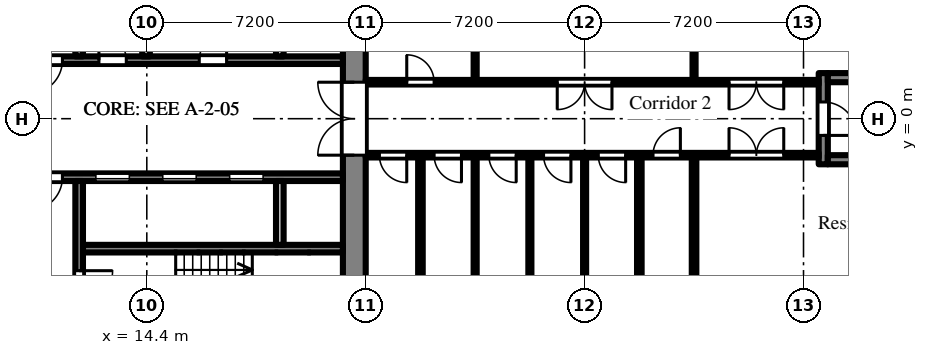
"""IFC4 building model, lengths in metres.
Left out: names, types, materials, properties, quantities, classifications, styles, units other than length and angle.
Written with IfcOpenShell. Run it as: python <this file> out.ifc"""

import sys

from ifc_helpers import new_model, si_unit, direction, frame, frame_2d, origin, place, context, subcontext, project, spatial, rectangle, extrude, element, fill, save


model = new_model("IFC4")
c1 = context("Model", 3, precision=1e-05, world=origin(), true_north=direction((0.0, 1.0)))
c2 = subcontext(c1, "Body", "Model", "MODEL_VIEW")
j1 = project(units=[si_unit("LENGTHUNIT", "METRE"), si_unit("PLANEANGLEUNIT", "RADIAN")], contexts=[c1])
p1 = place(None, origin())
s1 = spatial("IfcSite", under=j1, at=p1, CompositionType="ELEMENT")
p2 = place(p1, origin())
s2 = spatial("IfcBuilding", under=s1, at=p2, CompositionType="ELEMENT")
p3 = place(p2, frame((0.0, 0.0, 20.7)))
s3 = spatial("IfcBuildingStorey", under=s2, at=p3, CompositionType="ELEMENT", Elevation=20.7)
p4 = place(p3, frame((21.225, -7.2, 0.0), z_axis=(0.0, 0.0, 1.0), x_axis=(0.0, 1.0, 0.0)))
e1 = element("IfcWall", 1, at=p4, inside=s3, PredefinedType="SHEAR", context=c2, shape_type="SweptSolid", body=[
    extrude(rectangle(XDim=14.4, YDim=0.75, at=frame_2d((7.2, 0.0))), origin(), (0.0, 0.0, 1.0), 2.575),
])
p5 = place(p4, frame((6.0, 0.0, 0.0)))
e2 = element("IfcOpeningElement", 2, at=p5, cuts=e1, PredefinedType="OPENING", context=c2, shape_type="SweptSolid", body=[
    extrude(rectangle(XDim=2.4, YDim=2.2, at=frame_2d((1.2, 1.1))), frame((0.0, 0.385, 0.0), z_axis=(0.0, -1.0, 0.0), x_axis=(1.0, 0.0, 0.0)), (0.0, 0.0, 1.0), 0.77),
])
p6 = place(p3, frame((7.9, 1.925, 0.0), z_axis=(0.0, 0.0, 1.0), x_axis=(1.0, 0.0, 0.0)))
e3 = element("IfcWall", 3, at=p6, inside=s3, PredefinedType="SHEAR", context=c2, shape_type="SweptSolid", body=[
    extrude(rectangle(XDim=12.95, YDim=0.25, at=frame_2d((6.475, 0.0))), origin(), (0.0, 0.0, 1.0), 2.575),
])
p7 = place(p6, frame((0.525, 0.0, 0.0)))
e4 = element("IfcOpeningElement", 4, at=p7, cuts=e3, PredefinedType="OPENING", context=c2, shape_type="SweptSolid", body=[
    extrude(rectangle(XDim=0.9, YDim=2.1, at=frame_2d((0.45, 1.05))), frame((0.0, 0.135, 0.0), z_axis=(0.0, -1.0, 0.0), x_axis=(1.0, 0.0, 0.0)), (0.0, 0.0, 1.0), 0.27),
])
p8 = place(p6, frame((2.625, 0.0, 0.0)))
e5 = element("IfcOpeningElement", 5, at=p8, cuts=e3, PredefinedType="OPENING", context=c2, shape_type="SweptSolid", body=[
    extrude(rectangle(XDim=1.1, YDim=2.1, at=frame_2d((0.55, 1.05))), frame((0.0, 0.135, 0.0), z_axis=(0.0, -1.0, 0.0), x_axis=(1.0, 0.0, 0.0)), (0.0, 0.0, 1.0), 0.27),
])
p9 = place(p6, frame((4.925, 0.0, 0.0)))
e6 = element("IfcOpeningElement", 6, at=p9, cuts=e3, PredefinedType="OPENING", context=c2, shape_type="SweptSolid", body=[
    extrude(rectangle(XDim=0.9, YDim=2.1, at=frame_2d((0.45, 1.05))), frame((0.0, 0.135, 0.0), z_axis=(0.0, -1.0, 0.0), x_axis=(1.0, 0.0, 0.0)), (0.0, 0.0, 1.0), 0.27),
])
p10 = place(p6, frame((8.225, 0.0, 0.0)))
e7 = element("IfcOpeningElement", 7, at=p10, cuts=e3, PredefinedType="OPENING", context=c2, shape_type="SweptSolid", body=[
    extrude(rectangle(XDim=0.9, YDim=2.1, at=frame_2d((0.45, 1.05))), frame((0.0, 0.135, 0.0), z_axis=(0.0, -1.0, 0.0), x_axis=(1.0, 0.0, 0.0)), (0.0, 0.0, 1.0), 0.27),
])
p11 = place(p3, frame((12.175, 2.05, 0.0), z_axis=(0.0, 0.0, 1.0), x_axis=(0.0, 1.0, 0.0)))
e8 = element("IfcWall", 8, at=p11, inside=s3, PredefinedType="SHEAR", context=c2, shape_type="SweptSolid", body=[
    extrude(rectangle(XDim=4.65, YDim=0.25, at=frame_2d((2.325, 0.0))), origin(), (0.0, 0.0, 1.0), 2.575),
])
p12 = place(p11, frame((2.95, 0.0, 0.0)))
e9 = element("IfcOpeningElement", 9, at=p12, cuts=e8, PredefinedType="OPENING", context=c2, shape_type="SweptSolid", body=[
    extrude(rectangle(XDim=1.1, YDim=2.1, at=frame_2d((0.55, 1.05))), frame((0.0, 0.135, 0.0), z_axis=(0.0, -1.0, 0.0), x_axis=(1.0, 0.0, 0.0)), (0.0, 0.0, 1.0), 0.27),
])
for number, where, z_axis, x_axis in (
    (10, (14.375, 2.05, 0.0), (0.0, 0.0, 1.0), (0.0, 1.0, 0.0)),
    (11, (18.775, 2.05, 0.0), (0.0, 0.0, 1.0), (0.0, 1.0, 0.0)),
):
    element("IfcWall", number, at=place(p3, frame(where, z_axis=z_axis, x_axis=x_axis)), inside=s3, PredefinedType="PARTITIONING", context=c2, shape_type="SweptSolid", body=[
        extrude(rectangle(XDim=2.1, YDim=0.25, at=frame_2d((1.05, 0.0))), origin(), (0.0, 0.0, 1.0), 2.575),
    ])
p13 = place(p3, frame((7.9, -1.925, 0.0), z_axis=(0.0, 0.0, 1.0), x_axis=(1.0, 0.0, 0.0)))
e12 = element("IfcWall", 12, at=p13, inside=s3, PredefinedType="SHEAR", context=c2, shape_type="SweptSolid", body=[
    extrude(rectangle(XDim=12.95, YDim=0.25, at=frame_2d((6.475, 0.0))), origin(), (0.0, 0.0, 1.0), 2.575),
])
p14 = place(p13, frame((4.825, 0.0, 0.0)))
e13 = element("IfcOpeningElement", 13, at=p14, cuts=e12, PredefinedType="OPENING", context=c2, shape_type="SweptSolid", body=[
    extrude(rectangle(XDim=1.1, YDim=2.1, at=frame_2d((0.55, 1.05))), frame((0.0, 0.135, 0.0), z_axis=(0.0, -1.0, 0.0), x_axis=(1.0, 0.0, 0.0)), (0.0, 0.0, 1.0), 0.27),
])
p15 = place(p13, frame((7.025, 0.0, 0.0)))
e14 = element("IfcOpeningElement", 14, at=p15, cuts=e12, PredefinedType="OPENING", context=c2, shape_type="SweptSolid", body=[
    extrude(rectangle(XDim=1.1, YDim=2.1, at=frame_2d((0.55, 1.05))), frame((0.0, 0.135, 0.0), z_axis=(0.0, -1.0, 0.0), x_axis=(1.0, 0.0, 0.0)), (0.0, 0.0, 1.0), 0.27),
])
p16 = place(p13, frame((9.225, 0.0, 0.0)))
e15 = element("IfcOpeningElement", 15, at=p16, cuts=e12, PredefinedType="OPENING", context=c2, shape_type="SweptSolid", body=[
    extrude(rectangle(XDim=1.1, YDim=2.1, at=frame_2d((0.55, 1.05))), frame((0.0, 0.135, 0.0), z_axis=(0.0, -1.0, 0.0), x_axis=(1.0, 0.0, 0.0)), (0.0, 0.0, 1.0), 0.27),
])
p17 = place(p13, frame((0.525, 0.0, 0.0)))
e16 = element("IfcOpeningElement", 16, at=p17, cuts=e12, PredefinedType="OPENING", context=c2, shape_type="SweptSolid", body=[
    extrude(rectangle(XDim=0.9, YDim=2.1, at=frame_2d((0.45, 1.05))), frame((0.0, 0.135, 0.0), z_axis=(0.0, -1.0, 0.0), x_axis=(1.0, 0.0, 0.0)), (0.0, 0.0, 1.0), 0.27),
])
p18 = place(p13, frame((2.625, 0.0, 0.0)))
e17 = element("IfcOpeningElement", 17, at=p18, cuts=e12, PredefinedType="OPENING", context=c2, shape_type="SweptSolid", body=[
    extrude(rectangle(XDim=1.1, YDim=2.1, at=frame_2d((0.55, 1.05))), frame((0.0, 0.135, 0.0), z_axis=(0.0, -1.0, 0.0), x_axis=(1.0, 0.0, 0.0)), (0.0, 0.0, 1.0), 0.27),
])
p19 = place(p3, frame((12.3, -4.275, 0.0), z_axis=(0.0, 0.0, 1.0), x_axis=(1.0, 0.0, 0.0)))
e18 = element("IfcWall", 18, at=p19, inside=s3, PredefinedType="SHEAR", context=c2, shape_type="SweptSolid", body=[
    extrude(rectangle(XDim=8.55, YDim=0.25, at=frame_2d((4.275, 0.0))), origin(), (0.0, 0.0, 1.0), 2.575),
])
p20 = place(p3, frame((12.175, -2.05, 0.0), z_axis=(0.0, 0.0, 1.0), x_axis=(0.0, -1.0, 0.0)))
e19 = element("IfcWall", 19, at=p20, inside=s3, PredefinedType="SHEAR", context=c2, shape_type="SweptSolid", body=[
    extrude(rectangle(XDim=4.65, YDim=0.25, at=frame_2d((2.325, 0.0))), origin(), (0.0, 0.0, 1.0), 2.575),
])
p21 = place(p20, frame((2.95, 0.0, 0.0)))
e20 = element("IfcOpeningElement", 20, at=p21, cuts=e19, PredefinedType="OPENING", context=c2, shape_type="SweptSolid", body=[
    extrude(rectangle(XDim=1.1, YDim=2.1, at=frame_2d((0.55, 1.05))), frame((0.0, 0.135, 0.0), z_axis=(0.0, -1.0, 0.0), x_axis=(1.0, 0.0, 0.0)), (0.0, 0.0, 1.0), 0.27),
])
p22 = place(p3, frame((18.775, -2.05, 0.0), z_axis=(0.0, 0.0, 1.0), x_axis=(0.0, -1.0, 0.0)))
e21 = element("IfcWall", 21, at=p22, inside=s3, PredefinedType="PARTITIONING", context=c2, shape_type="SweptSolid", body=[
    extrude(rectangle(XDim=2.1, YDim=0.25, at=frame_2d((1.05, 0.0))), origin(), (0.0, 0.0, 1.0), 2.575),
])
p23 = place(p3, frame((36.65, -1.5, 0.0), z_axis=(0.0, 0.0, 1.0), x_axis=(0.0, 1.0, 0.0)))
e22 = element("IfcWall", 22, at=p23, inside=s3, PredefinedType="SHEAR", context=c2, shape_type="SweptSolid", body=[
    extrude(rectangle(XDim=3.0, YDim=0.3, at=frame_2d((1.5, 0.0))), origin(), (0.0, 0.0, 1.0), 2.575),
])
p24 = place(p23, frame((0.95, 0.0, 0.0)))
e23 = element("IfcOpeningElement", 23, at=p24, cuts=e22, PredefinedType="OPENING", context=c2, shape_type="SweptSolid", body=[
    extrude(rectangle(XDim=1.1, YDim=2.1, at=frame_2d((0.55, 1.05))), frame((0.0, 0.16, 0.0), z_axis=(0.0, -1.0, 0.0), x_axis=(1.0, 0.0, 0.0)), (0.0, 0.0, 1.0), 0.32),
])
for number, where, z_axis, x_axis in (
    (24, (36.8, -1.35, 0.0), (0.0, 0.0, 1.0), (1.0, 0.0, 0.0)),
    (25, (36.8, 1.35, 0.0), (0.0, 0.0, 1.0), (1.0, 0.0, 0.0)),
):
    element("IfcWall", number, at=place(p3, frame(where, z_axis=z_axis, x_axis=x_axis)), inside=s3, PredefinedType="SHEAR", context=c2, shape_type="SweptSolid", body=[
        extrude(rectangle(XDim=5.8, YDim=0.3, at=frame_2d((2.9, 0.0))), origin(), (0.0, 0.0, 1.0), 2.575),
    ])
p25 = place(p3, frame((21.6, -1.2, 0.0), z_axis=(0.0, 0.0, 1.0), x_axis=(1.0, 0.0, 0.0)))
e26 = element("IfcWall", 26, at=p25, inside=s3, PredefinedType="PARTITIONING", context=c2, shape_type="SweptSolid", body=[
    extrude(rectangle(XDim=14.9, YDim=0.15, at=frame_2d((7.45, 0.0))), origin(), (0.0, 0.0, 1.0), 2.575),
])
p26 = place(p25, frame((0.45, 0.0, 0.0)))
e27 = element("IfcOpeningElement", 27, at=p26, cuts=e26, PredefinedType="OPENING", context=c2, shape_type="SweptSolid", body=[
    extrude(rectangle(XDim=0.9, YDim=2.1, at=frame_2d((0.45, 1.05))), frame((0.0, 0.085, 0.0), z_axis=(0.0, -1.0, 0.0), x_axis=(1.0, 0.0, 0.0)), (0.0, 0.0, 1.0), 0.17),
])
p27 = place(p25, frame((2.25, 0.0, 0.0)))
e28 = element("IfcOpeningElement", 28, at=p27, cuts=e26, PredefinedType="OPENING", context=c2, shape_type="SweptSolid", body=[
    extrude(rectangle(XDim=0.9, YDim=2.1, at=frame_2d((0.45, 1.05))), frame((0.0, 0.085, 0.0), z_axis=(0.0, -1.0, 0.0), x_axis=(1.0, 0.0, 0.0)), (0.0, 0.0, 1.0), 0.17),
])
p28 = place(p25, frame((4.05, 0.0, 0.0)))
e29 = element("IfcOpeningElement", 29, at=p28, cuts=e26, PredefinedType="OPENING", context=c2, shape_type="SweptSolid", body=[
    extrude(rectangle(XDim=0.9, YDim=2.1, at=frame_2d((0.45, 1.05))), frame((0.0, 0.085, 0.0), z_axis=(0.0, -1.0, 0.0), x_axis=(1.0, 0.0, 0.0)), (0.0, 0.0, 1.0), 0.17),
])
p29 = place(p25, frame((5.85, 0.0, 0.0)))
e30 = element("IfcOpeningElement", 30, at=p29, cuts=e26, PredefinedType="OPENING", context=c2, shape_type="SweptSolid", body=[
    extrude(rectangle(XDim=0.9, YDim=2.1, at=frame_2d((0.45, 1.05))), frame((0.0, 0.085, 0.0), z_axis=(0.0, -1.0, 0.0), x_axis=(1.0, 0.0, 0.0)), (0.0, 0.0, 1.0), 0.17),
])
p30 = place(p25, frame((7.65, 0.0, 0.0)))
e31 = element("IfcOpeningElement", 31, at=p30, cuts=e26, PredefinedType="OPENING", context=c2, shape_type="SweptSolid", body=[
    extrude(rectangle(XDim=0.9, YDim=2.1, at=frame_2d((0.45, 1.05))), frame((0.0, 0.085, 0.0), z_axis=(0.0, -1.0, 0.0), x_axis=(1.0, 0.0, 0.0)), (0.0, 0.0, 1.0), 0.17),
])
p31 = place(p25, frame((9.45, 0.0, 0.0)))
e32 = element("IfcOpeningElement", 32, at=p31, cuts=e26, PredefinedType="OPENING", context=c2, shape_type="SweptSolid", body=[
    extrude(rectangle(XDim=0.9, YDim=2.1, at=frame_2d((0.45, 1.05))), frame((0.0, 0.085, 0.0), z_axis=(0.0, -1.0, 0.0), x_axis=(1.0, 0.0, 0.0)), (0.0, 0.0, 1.0), 0.17),
])
p32 = place(p25, frame((11.95, 0.0, 0.0)))
e33 = element("IfcOpeningElement", 33, at=p32, cuts=e26, PredefinedType="OPENING", context=c2, shape_type="SweptSolid", body=[
    extrude(rectangle(XDim=1.8, YDim=2.1, at=frame_2d((0.9, 1.05))), frame((0.0, 0.085, 0.0), z_axis=(0.0, -1.0, 0.0), x_axis=(1.0, 0.0, 0.0)), (0.0, 0.0, 1.0), 0.17),
])
p33 = place(p3, frame((21.6, 1.2, 0.0), z_axis=(0.0, 0.0, 1.0), x_axis=(1.0, 0.0, 0.0)))
e34 = element("IfcWall", 34, at=p33, inside=s3, PredefinedType="PARTITIONING", context=c2, shape_type="SweptSolid", body=[
    extrude(rectangle(XDim=14.9, YDim=0.15, at=frame_2d((7.45, 0.0))), origin(), (0.0, 0.0, 1.0), 2.575),
])
p34 = place(p33, frame((1.35, 0.0, 0.0)))
e35 = element("IfcOpeningElement", 35, at=p34, cuts=e34, PredefinedType="OPENING", context=c2, shape_type="SweptSolid", body=[
    extrude(rectangle(XDim=0.9, YDim=2.1, at=frame_2d((0.45, 1.05))), frame((0.0, 0.085, 0.0), z_axis=(0.0, -1.0, 0.0), x_axis=(1.0, 0.0, 0.0)), (0.0, 0.0, 1.0), 0.17),
])
p35 = place(p33, frame((6.3, 0.0, 0.0)))
e36 = element("IfcOpeningElement", 36, at=p35, cuts=e34, PredefinedType="OPENING", context=c2, shape_type="SweptSolid", body=[
    extrude(rectangle(XDim=1.8, YDim=2.1, at=frame_2d((0.9, 1.05))), frame((0.0, 0.085, 0.0), z_axis=(0.0, -1.0, 0.0), x_axis=(1.0, 0.0, 0.0)), (0.0, 0.0, 1.0), 0.17),
])
p36 = place(p33, frame((11.95, 0.0, 0.0)))
e37 = element("IfcOpeningElement", 37, at=p36, cuts=e34, PredefinedType="OPENING", context=c2, shape_type="SweptSolid", body=[
    extrude(rectangle(XDim=1.8, YDim=2.1, at=frame_2d((0.9, 1.05))), frame((0.0, 0.085, 0.0), z_axis=(0.0, -1.0, 0.0), x_axis=(1.0, 0.0, 0.0)), (0.0, 0.0, 1.0), 0.17),
])
p37 = place(p3, frame((23.4, -6.9, 0.0), z_axis=(0.0, 0.0, 1.0), x_axis=(0.0, 1.0, 0.0)))
e38 = element("IfcWall", 38, at=p37, inside=s3, PredefinedType="PARTITIONING", context=c2, shape_type="SweptSolid", body=[
    extrude(rectangle(XDim=5.625, YDim=0.15, at=frame_2d((2.812, 0.0))), origin(), (0.0, 0.0, 1.0), 2.575),
])
for number, where, z_axis, x_axis in (
    (39, (25.2, -6.9, 0.0), (0.0, 0.0, 1.0), (0.0, 1.0, 0.0)),
    (40, (25.2, 1.275, 0.0), (0.0, 0.0, 1.0), (0.0, 1.0, 0.0)),
    (41, (27.0, -6.9, 0.0), (0.0, 0.0, 1.0), (0.0, 1.0, 0.0)),
    (42, (28.8, -6.9, 0.0), (0.0, 0.0, 1.0), (0.0, 1.0, 0.0)),
):
    element("IfcWall", number, at=place(p3, frame(where, z_axis=z_axis, x_axis=x_axis)), inside=s3, PredefinedType="PARTITIONING", context=c2, shape_type="SweptSolid", body=[
        extrude(rectangle(XDim=5.625, YDim=0.1, at=frame_2d((2.812, 0.0))), origin(), (0.0, 0.0, 1.0), 2.575),
    ])
for number, where, z_axis, x_axis in (
    (43, (30.6, -6.9, 0.0), (0.0, 0.0, 1.0), (0.0, 1.0, 0.0)),
    (44, (32.4, -6.9, 0.0), (0.0, 0.0, 1.0), (0.0, 1.0, 0.0)),
):
    element("IfcWall", number, at=place(p3, frame(where, z_axis=z_axis, x_axis=x_axis)), inside=s3, PredefinedType="PARTITIONING", context=c2, shape_type="SweptSolid", body=[
        extrude(rectangle(XDim=5.625, YDim=0.15, at=frame_2d((2.812, 0.0))), origin(), (0.0, 0.0, 1.0), 2.575),
    ])
p38 = place(p3, frame((32.4, 1.275, 0.0), z_axis=(0.0, 0.0, 1.0), x_axis=(0.0, 1.0, 0.0)))
e45 = element("IfcWall", 45, at=p38, inside=s3, PredefinedType="PARTITIONING", context=c2, shape_type="SweptSolid", body=[
    extrude(rectangle(XDim=5.625, YDim=0.1, at=frame_2d((2.812, 0.0))), origin(), (0.0, 0.0, 1.0), 2.575),
])
p39 = place(p14, origin())
e46 = element("IfcDoor", 46, at=p39, inside=s3, OperationType="SLIDING_TO_LEFT", PredefinedType="DOOR", context=c2, shape_type="SweptSolid", body=[
    extrude(rectangle(XDim=1.1, YDim=2.1, at=frame_2d((0.55, 1.05))), frame((0.0, 0.025, 0.0), z_axis=(0.0, -1.0, 0.0), x_axis=(1.0, 0.0, 0.0)), (0.0, 0.0, 1.0), 0.05),
])
fill(e13, e46)
p40 = place(p15, origin())
e47 = element("IfcDoor", 47, at=p40, inside=s3, OperationType="SLIDING_TO_LEFT", PredefinedType="DOOR", context=c2, shape_type="SweptSolid", body=[
    extrude(rectangle(XDim=1.1, YDim=2.1, at=frame_2d((0.55, 1.05))), frame((0.0, 0.025, 0.0), z_axis=(0.0, -1.0, 0.0), x_axis=(1.0, 0.0, 0.0)), (0.0, 0.0, 1.0), 0.05),
])
fill(e14, e47)
p41 = place(p16, origin())
e48 = element("IfcDoor", 48, at=p41, inside=s3, OperationType="SLIDING_TO_LEFT", PredefinedType="DOOR", context=c2, shape_type="SweptSolid", body=[
    extrude(rectangle(XDim=1.1, YDim=2.1, at=frame_2d((0.55, 1.05))), frame((0.0, 0.025, 0.0), z_axis=(0.0, -1.0, 0.0), x_axis=(1.0, 0.0, 0.0)), (0.0, 0.0, 1.0), 0.05),
])
fill(e15, e48)
p42 = place(p21, origin())
e49 = element("IfcDoor", 49, at=p42, inside=s3, OperationType="SINGLE_SWING_LEFT", PredefinedType="DOOR", context=c2, shape_type="SweptSolid", body=[
    extrude(rectangle(XDim=1.1, YDim=2.1, at=frame_2d((0.55, 1.05))), frame((0.0, 0.025, 0.0), z_axis=(0.0, -1.0, 0.0), x_axis=(1.0, 0.0, 0.0)), (0.0, 0.0, 1.0), 0.05),
])
fill(e20, e49)
p43 = place(p8, frame((1.1, 0.0, 0.0), z_axis=(0.0, 0.0, 1.0), x_axis=(-1.0, 0.0, 0.0)))
e50 = element("IfcDoor", 50, at=p43, inside=s3, OperationType="SINGLE_SWING_RIGHT", PredefinedType="DOOR", context=c2, shape_type="SweptSolid", body=[
    extrude(rectangle(XDim=1.1, YDim=2.1, at=frame_2d((0.55, 1.05))), frame((0.0, 0.025, 0.0), z_axis=(0.0, -1.0, 0.0), x_axis=(1.0, 0.0, 0.0)), (0.0, 0.0, 1.0), 0.05),
])
fill(e5, e50)
p44 = place(p18, frame((1.1, 0.0, 0.0), z_axis=(0.0, 0.0, 1.0), x_axis=(-1.0, 0.0, 0.0)))
e51 = element("IfcDoor", 51, at=p44, inside=s3, OperationType="SINGLE_SWING_RIGHT", PredefinedType="DOOR", context=c2, shape_type="SweptSolid", body=[
    extrude(rectangle(XDim=1.1, YDim=2.1, at=frame_2d((0.55, 1.05))), frame((0.0, 0.025, 0.0), z_axis=(0.0, -1.0, 0.0), x_axis=(1.0, 0.0, 0.0)), (0.0, 0.0, 1.0), 0.05),
])
fill(e17, e51)
p45 = place(p5, origin())
e52 = element("IfcDoor", 52, at=p45, inside=s3, OperationType="DOUBLE_DOOR_DOUBLE_SWING", PredefinedType="DOOR", context=c2, shape_type="SweptSolid", body=[
    extrude(rectangle(XDim=2.4, YDim=2.2, at=frame_2d((1.2, 1.1))), frame((0.0, 0.025, 0.0), z_axis=(0.0, -1.0, 0.0), x_axis=(1.0, 0.0, 0.0)), (0.0, 0.0, 1.0), 0.05),
])
fill(e2, e52)
p46 = place(p9, origin())
e53 = element("IfcDoor", 53, at=p46, inside=s3, OperationType="SINGLE_SWING_LEFT", PredefinedType="DOOR", context=c2, shape_type="SweptSolid", body=[
    extrude(rectangle(XDim=0.9, YDim=2.1, at=frame_2d((0.45, 1.05))), frame((0.0, 0.025, 0.0), z_axis=(0.0, -1.0, 0.0), x_axis=(1.0, 0.0, 0.0)), (0.0, 0.0, 1.0), 0.05),
])
fill(e6, e53)
p47 = place(p10, origin())
e54 = element("IfcDoor", 54, at=p47, inside=s3, OperationType="SINGLE_SWING_RIGHT", PredefinedType="DOOR", context=c2, shape_type="SweptSolid", body=[
    extrude(rectangle(XDim=0.9, YDim=2.1, at=frame_2d((0.45, 1.05))), frame((0.0, 0.025, 0.0), z_axis=(0.0, -1.0, 0.0), x_axis=(1.0, 0.0, 0.0)), (0.0, 0.0, 1.0), 0.05),
])
fill(e7, e54)
p48 = place(p24, frame((1.1, 0.0, 0.0), z_axis=(0.0, 0.0, 1.0), x_axis=(-1.0, 0.0, 0.0)))
e55 = element("IfcDoor", 55, at=p48, inside=s3, OperationType="SINGLE_SWING_RIGHT", PredefinedType="DOOR", context=c2, shape_type="SweptSolid", body=[
    extrude(rectangle(XDim=1.1, YDim=2.1, at=frame_2d((0.55, 1.05))), frame((0.0, 0.025, 0.0), z_axis=(0.0, -1.0, 0.0), x_axis=(1.0, 0.0, 0.0)), (0.0, 0.0, 1.0), 0.05),
])
fill(e23, e55)
p49 = place(p34, origin())
e56 = element("IfcDoor", 56, at=p49, inside=s3, OperationType="SINGLE_SWING_LEFT", PredefinedType="DOOR", context=c2, shape_type="SweptSolid", body=[
    extrude(rectangle(XDim=0.9, YDim=2.1, at=frame_2d((0.45, 1.05))), frame((0.0, 0.025, 0.0), z_axis=(0.0, -1.0, 0.0), x_axis=(1.0, 0.0, 0.0)), (0.0, 0.0, 1.0), 0.05),
])
fill(e35, e56)
p50 = place(p35, frame((1.8, 0.0, 0.0), z_axis=(0.0, 0.0, 1.0), x_axis=(-1.0, 0.0, 0.0)))
e57 = element("IfcDoor", 57, at=p50, inside=s3, OperationType="DOUBLE_DOOR_DOUBLE_SWING", PredefinedType="DOOR", context=c2, shape_type="SweptSolid", body=[
    extrude(rectangle(XDim=1.8, YDim=2.1, at=frame_2d((0.9, 1.05))), frame((0.0, 0.025, 0.0), z_axis=(0.0, -1.0, 0.0), x_axis=(1.0, 0.0, 0.0)), (0.0, 0.0, 1.0), 0.05),
])
fill(e36, e57)
p51 = place(p36, frame((1.8, 0.0, 0.0), z_axis=(0.0, 0.0, 1.0), x_axis=(-1.0, 0.0, 0.0)))
e58 = element("IfcDoor", 58, at=p51, inside=s3, OperationType="DOUBLE_DOOR_DOUBLE_SWING", PredefinedType="DOOR", context=c2, shape_type="SweptSolid", body=[
    extrude(rectangle(XDim=1.8, YDim=2.1, at=frame_2d((0.9, 1.05))), frame((0.0, 0.025, 0.0), z_axis=(0.0, -1.0, 0.0), x_axis=(1.0, 0.0, 0.0)), (0.0, 0.0, 1.0), 0.05),
])
fill(e37, e58)
p52 = place(p26, frame((0.9, 0.0, 0.0), z_axis=(0.0, 0.0, 1.0), x_axis=(-1.0, 0.0, 0.0)))
e59 = element("IfcDoor", 59, at=p52, inside=s3, OperationType="SINGLE_SWING_LEFT", PredefinedType="DOOR", context=c2, shape_type="SweptSolid", body=[
    extrude(rectangle(XDim=0.9, YDim=2.1, at=frame_2d((0.45, 1.05))), frame((0.0, 0.025, 0.0), z_axis=(0.0, -1.0, 0.0), x_axis=(1.0, 0.0, 0.0)), (0.0, 0.0, 1.0), 0.05),
])
fill(e27, e59)
p53 = place(p27, frame((0.9, 0.0, 0.0), z_axis=(0.0, 0.0, 1.0), x_axis=(-1.0, 0.0, 0.0)))
e60 = element("IfcDoor", 60, at=p53, inside=s3, OperationType="SINGLE_SWING_LEFT", PredefinedType="DOOR", context=c2, shape_type="SweptSolid", body=[
    extrude(rectangle(XDim=0.9, YDim=2.1, at=frame_2d((0.45, 1.05))), frame((0.0, 0.025, 0.0), z_axis=(0.0, -1.0, 0.0), x_axis=(1.0, 0.0, 0.0)), (0.0, 0.0, 1.0), 0.05),
])
fill(e28, e60)
p54 = place(p28, frame((0.9, 0.0, 0.0), z_axis=(0.0, 0.0, 1.0), x_axis=(-1.0, 0.0, 0.0)))
e61 = element("IfcDoor", 61, at=p54, inside=s3, OperationType="SINGLE_SWING_LEFT", PredefinedType="DOOR", context=c2, shape_type="SweptSolid", body=[
    extrude(rectangle(XDim=0.9, YDim=2.1, at=frame_2d((0.45, 1.05))), frame((0.0, 0.025, 0.0), z_axis=(0.0, -1.0, 0.0), x_axis=(1.0, 0.0, 0.0)), (0.0, 0.0, 1.0), 0.05),
])
fill(e29, e61)
p55 = place(p29, frame((0.9, 0.0, 0.0), z_axis=(0.0, 0.0, 1.0), x_axis=(-1.0, 0.0, 0.0)))
e62 = element("IfcDoor", 62, at=p55, inside=s3, OperationType="SINGLE_SWING_LEFT", PredefinedType="DOOR", context=c2, shape_type="SweptSolid", body=[
    extrude(rectangle(XDim=0.9, YDim=2.1, at=frame_2d((0.45, 1.05))), frame((0.0, 0.025, 0.0), z_axis=(0.0, -1.0, 0.0), x_axis=(1.0, 0.0, 0.0)), (0.0, 0.0, 1.0), 0.05),
])
fill(e30, e62)
p56 = place(p30, frame((0.9, 0.0, 0.0), z_axis=(0.0, 0.0, 1.0), x_axis=(-1.0, 0.0, 0.0)))
e63 = element("IfcDoor", 63, at=p56, inside=s3, OperationType="SINGLE_SWING_LEFT", PredefinedType="DOOR", context=c2, shape_type="SweptSolid", body=[
    extrude(rectangle(XDim=0.9, YDim=2.1, at=frame_2d((0.45, 1.05))), frame((0.0, 0.025, 0.0), z_axis=(0.0, -1.0, 0.0), x_axis=(1.0, 0.0, 0.0)), (0.0, 0.0, 1.0), 0.05),
])
fill(e31, e63)
p57 = place(p31, origin())
e64 = element("IfcDoor", 64, at=p57, inside=s3, OperationType="SINGLE_SWING_RIGHT", PredefinedType="DOOR", context=c2, shape_type="SweptSolid", body=[
    extrude(rectangle(XDim=0.9, YDim=2.1, at=frame_2d((0.45, 1.05))), frame((0.0, 0.025, 0.0), z_axis=(0.0, -1.0, 0.0), x_axis=(1.0, 0.0, 0.0)), (0.0, 0.0, 1.0), 0.05),
])
fill(e32, e64)
p58 = place(p32, origin())
e65 = element("IfcDoor", 65, at=p58, inside=s3, OperationType="DOUBLE_DOOR_DOUBLE_SWING", PredefinedType="DOOR", context=c2, shape_type="SweptSolid", body=[
    extrude(rectangle(XDim=1.8, YDim=2.1, at=frame_2d((0.9, 1.05))), frame((0.0, 0.025, 0.0), z_axis=(0.0, -1.0, 0.0), x_axis=(1.0, 0.0, 0.0)), (0.0, 0.0, 1.0), 0.05),
])
fill(e33, e65)
save(model, sys.argv[1])
